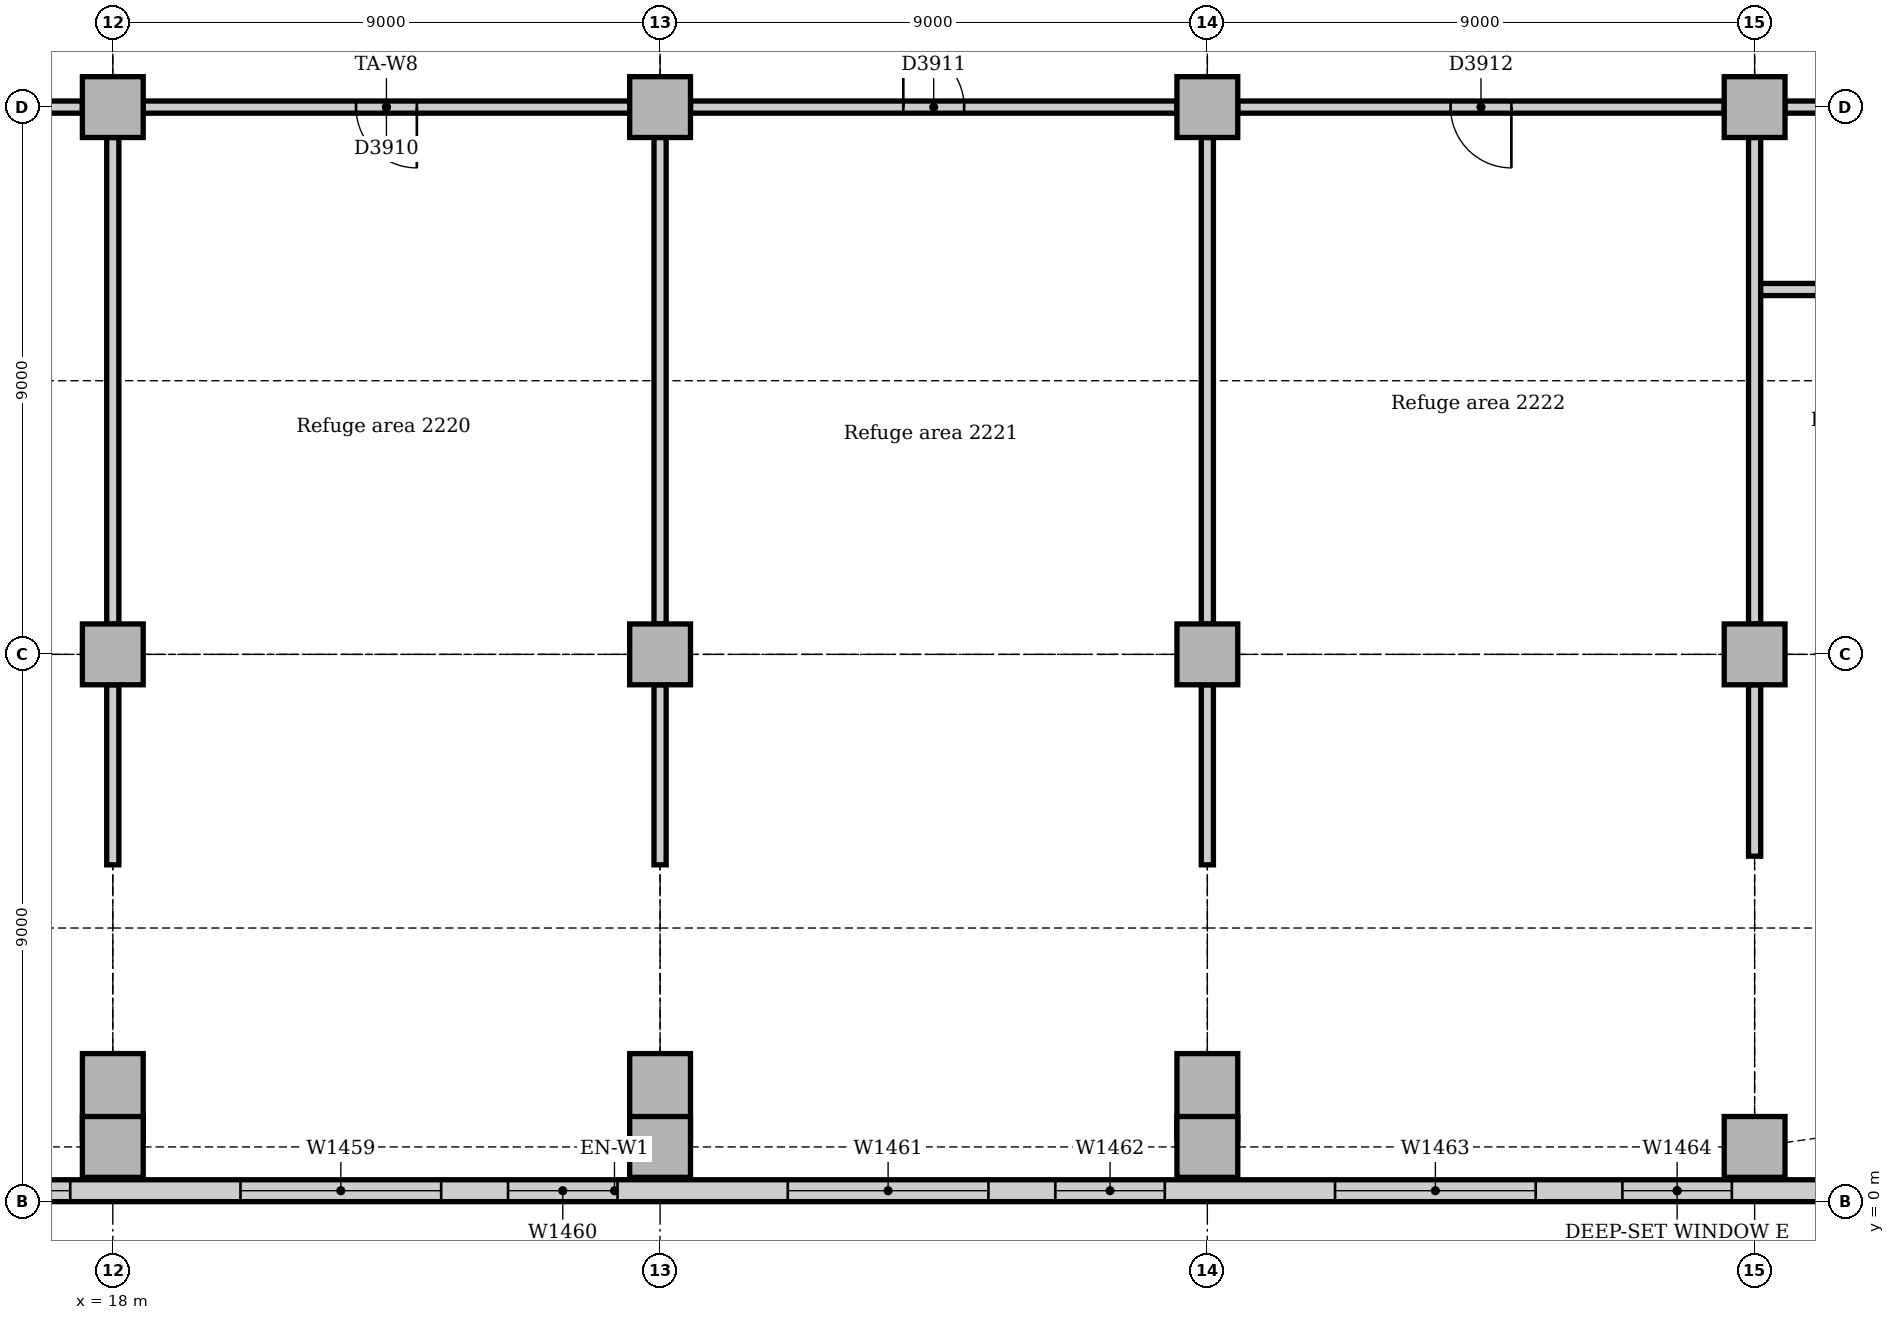
"""IFC4 building model, lengths in metres.
Left out: names, types, materials, properties, quantities, classifications, styles, units other than length and angle.
Written with IfcOpenShell. Run it as: python <this file> out.ifc"""

import sys

from ifc_helpers import new_model, si_unit, direction, frame, frame_2d, origin, origin_2d, place, context, subcontext, project, spatial, rectangle, extrude, element, fill, save


model = new_model("IFC4")
c1 = context("Model", 3, precision=1e-05, world=origin(), true_north=direction((0.0, 1.0)))
c2 = subcontext(c1, "Body", "Model", "MODEL_VIEW")
j1 = project(units=[si_unit("LENGTHUNIT", "METRE"), si_unit("PLANEANGLEUNIT", "RADIAN")], contexts=[c1])
p1 = place(None, origin())
s1 = spatial("IfcSite", under=j1, at=p1, CompositionType="ELEMENT")
p2 = place(p1, origin())
s2 = spatial("IfcBuilding", under=s1, at=p2, CompositionType="ELEMENT")
p3 = place(p2, frame((0.0, 0.0, 95.0)))
s3 = spatial("IfcBuildingStorey", under=s2, at=p3, CompositionType="ELEMENT", Elevation=95.0)
for number, where, z_axis, x_axis in (
    (1, (18.0, 0.9, 0.0), (0.0, 0.0, 1.0), (1.0, 0.0, 0.0)),
    (2, (27.0, 0.9, 0.0), (0.0, 0.0, 1.0), (1.0, 0.0, 0.0)),
    (3, (36.0, 0.9, 0.0), (0.0, 0.0, 1.0), (1.0, 0.0, 0.0)),
    (4, (45.0, 0.9, 0.0), (0.0, 0.0, 1.0), (1.0, 0.0, 0.0)),
    (5, (18.0, 9.0, 0.0), (0.0, 0.0, 1.0), (1.0, 0.0, 0.0)),
    (6, (18.0, 18.0, 0.0), (0.0, 0.0, 1.0), (1.0, 0.0, 0.0)),
    (7, (27.0, 9.0, 0.0), (0.0, 0.0, 1.0), (1.0, 0.0, 0.0)),
    (8, (27.0, 18.0, 0.0), (0.0, 0.0, 1.0), (1.0, 0.0, 0.0)),
    (9, (36.0, 9.0, 0.0), (0.0, 0.0, 1.0), (1.0, 0.0, 0.0)),
    (10, (36.0, 18.0, 0.0), (0.0, 0.0, 1.0), (1.0, 0.0, 0.0)),
    (11, (45.0, 9.0, 0.0), (0.0, 0.0, 1.0), (1.0, 0.0, 0.0)),
    (12, (45.0, 18.0, 0.0), (0.0, 0.0, 1.0), (1.0, 0.0, 0.0)),
):
    element("IfcColumn", number, at=place(p3, frame(where, z_axis=z_axis, x_axis=x_axis)), inside=s3, PredefinedType="COLUMN", context=c2, shape_type="SweptSolid", body=[
        extrude(rectangle(XDim=1.0, YDim=1.0, at=origin_2d()), origin(), (0.0, 0.0, 1.0), 4.85),
    ])
p4 = place(p3, frame((4.243, 0.18, 0.0), z_axis=(0.0, 0.0, 1.0), x_axis=(1.0, 0.0, 0.0)))
e13 = element("IfcWall", 13, at=p4, inside=s3, PredefinedType="STANDARD", context=c2, shape_type="SweptSolid", body=[
    extrude(rectangle(XDim=44.015, YDim=0.36, at=frame_2d((22.007, 0.0))), origin(), (0.0, 0.0, 1.0), 4.85),
])
p5 = place(p4, frame((2.257, 0.0, 1.2)))
e14 = element("IfcOpeningElement", 14, at=p5, cuts=e13, PredefinedType="OPENING", context=c2, shape_type="SweptSolid", body=[
    extrude(rectangle(XDim=1.8, YDim=1.2, at=frame_2d((0.9, 0.6))), frame((0.0, 0.19, 0.0), z_axis=(0.0, -1.0, 0.0), x_axis=(1.0, 0.0, 0.0)), (0.0, 0.0, 1.0), 0.38),
])
p6 = place(p4, frame((6.857, 0.0, 0.9)))
e15 = element("IfcOpeningElement", 15, at=p6, cuts=e13, PredefinedType="OPENING", context=c2, shape_type="SweptSolid", body=[
    extrude(rectangle(XDim=3.3, YDim=2.2, at=frame_2d((1.65, 1.1))), frame((0.0, 0.19, 0.0), z_axis=(0.0, -1.0, 0.0), x_axis=(1.0, 0.0, 0.0)), (0.0, 0.0, 1.0), 0.38),
])
p7 = place(p4, frame((11.257, 0.0, 1.2)))
e16 = element("IfcOpeningElement", 16, at=p7, cuts=e13, PredefinedType="OPENING", context=c2, shape_type="SweptSolid", body=[
    extrude(rectangle(XDim=1.8, YDim=1.2, at=frame_2d((0.9, 0.6))), frame((0.0, 0.19, 0.0), z_axis=(0.0, -1.0, 0.0), x_axis=(1.0, 0.0, 0.0)), (0.0, 0.0, 1.0), 0.38),
])
p8 = place(p4, frame((15.857, 0.0, 0.9)))
e17 = element("IfcOpeningElement", 17, at=p8, cuts=e13, PredefinedType="OPENING", context=c2, shape_type="SweptSolid", body=[
    extrude(rectangle(XDim=3.3, YDim=2.2, at=frame_2d((1.65, 1.1))), frame((0.0, 0.19, 0.0), z_axis=(0.0, -1.0, 0.0), x_axis=(1.0, 0.0, 0.0)), (0.0, 0.0, 1.0), 0.38),
])
p9 = place(p4, frame((20.257, 0.0, 1.2)))
e18 = element("IfcOpeningElement", 18, at=p9, cuts=e13, PredefinedType="OPENING", context=c2, shape_type="SweptSolid", body=[
    extrude(rectangle(XDim=1.8, YDim=1.2, at=frame_2d((0.9, 0.6))), frame((0.0, 0.19, 0.0), z_axis=(0.0, -1.0, 0.0), x_axis=(1.0, 0.0, 0.0)), (0.0, 0.0, 1.0), 0.38),
])
p10 = place(p4, frame((24.857, 0.0, 0.9)))
e19 = element("IfcOpeningElement", 19, at=p10, cuts=e13, PredefinedType="OPENING", context=c2, shape_type="SweptSolid", body=[
    extrude(rectangle(XDim=3.3, YDim=2.2, at=frame_2d((1.65, 1.1))), frame((0.0, 0.19, 0.0), z_axis=(0.0, -1.0, 0.0), x_axis=(1.0, 0.0, 0.0)), (0.0, 0.0, 1.0), 0.38),
])
p11 = place(p4, frame((29.257, 0.0, 1.2)))
e20 = element("IfcOpeningElement", 20, at=p11, cuts=e13, PredefinedType="OPENING", context=c2, shape_type="SweptSolid", body=[
    extrude(rectangle(XDim=1.8, YDim=1.2, at=frame_2d((0.9, 0.6))), frame((0.0, 0.19, 0.0), z_axis=(0.0, -1.0, 0.0), x_axis=(1.0, 0.0, 0.0)), (0.0, 0.0, 1.0), 0.38),
])
p12 = place(p4, frame((33.857, 0.0, 0.9)))
e21 = element("IfcOpeningElement", 21, at=p12, cuts=e13, PredefinedType="OPENING", context=c2, shape_type="SweptSolid", body=[
    extrude(rectangle(XDim=3.3, YDim=2.2, at=frame_2d((1.65, 1.1))), frame((0.0, 0.19, 0.0), z_axis=(0.0, -1.0, 0.0), x_axis=(1.0, 0.0, 0.0)), (0.0, 0.0, 1.0), 0.38),
])
p13 = place(p4, frame((38.583, 0.0, 0.9)))
e22 = element("IfcOpeningElement", 22, at=p13, cuts=e13, PredefinedType="OPENING", context=c2, shape_type="SweptSolid", body=[
    extrude(rectangle(XDim=1.8, YDim=2.2, at=frame_2d((0.9, 1.1))), frame((0.0, 0.19, 0.0), z_axis=(0.0, -1.0, 0.0), x_axis=(1.0, 0.0, 0.0)), (0.0, 0.0, 1.0), 0.38),
])
p14 = place(p3, frame((45.5, 18.0, 0.0), z_axis=(0.0, 0.0, 1.0), x_axis=(1.0, 0.0, 0.0)))
e23 = element("IfcWall", 23, at=p14, inside=s3, PredefinedType="PARTITIONING", context=c2, shape_type="SweptSolid", body=[
    extrude(rectangle(XDim=5.141, YDim=0.2, at=frame_2d((2.571, 0.0))), origin(), (0.0, 0.0, 1.0), 4.254),
])
p15 = place(p14, frame((2.05, 0.0, 0.0)))
e24 = element("IfcOpeningElement", 24, at=p15, cuts=e23, PredefinedType="OPENING", context=c2, shape_type="SweptSolid", body=[
    extrude(rectangle(XDim=1.0, YDim=2.1, at=frame_2d((0.5, 1.05))), frame((0.0, 0.11, 0.0), z_axis=(0.0, -1.0, 0.0), x_axis=(1.0, 0.0, 0.0)), (0.0, 0.0, 1.0), 0.22),
])
p16 = place(p3, frame((36.5, 18.0, 0.0), z_axis=(0.0, 0.0, 1.0), x_axis=(1.0, 0.0, 0.0)))
e25 = element("IfcWall", 25, at=p16, inside=s3, PredefinedType="PARTITIONING", context=c2, shape_type="SweptSolid", body=[
    extrude(rectangle(XDim=8.0, YDim=0.2, at=frame_2d((4.0, 0.0))), origin(), (0.0, 0.0, 1.0), 4.158),
])
p17 = place(p16, frame((3.5, 0.0, 0.0)))
e26 = element("IfcOpeningElement", 26, at=p17, cuts=e25, PredefinedType="OPENING", context=c2, shape_type="SweptSolid", body=[
    extrude(rectangle(XDim=1.0, YDim=2.1, at=frame_2d((0.5, 1.05))), frame((0.0, 0.11, 0.0), z_axis=(0.0, -1.0, 0.0), x_axis=(1.0, 0.0, 0.0)), (0.0, 0.0, 1.0), 0.22),
])
p18 = place(p3, frame((27.5, 18.0, 0.0), z_axis=(0.0, 0.0, 1.0), x_axis=(1.0, 0.0, 0.0)))
e27 = element("IfcWall", 27, at=p18, inside=s3, PredefinedType="PARTITIONING", context=c2, shape_type="SweptSolid", body=[
    extrude(rectangle(XDim=8.0, YDim=0.2, at=frame_2d((4.0, 0.0))), origin(), (0.0, 0.0, 1.0), 4.158),
])
p19 = place(p18, frame((3.5, 0.0, 0.0)))
e28 = element("IfcOpeningElement", 28, at=p19, cuts=e27, PredefinedType="OPENING", context=c2, shape_type="SweptSolid", body=[
    extrude(rectangle(XDim=1.0, YDim=2.1, at=frame_2d((0.5, 1.05))), frame((0.0, 0.11, 0.0), z_axis=(0.0, -1.0, 0.0), x_axis=(1.0, 0.0, 0.0)), (0.0, 0.0, 1.0), 0.22),
])
p20 = place(p3, frame((18.5, 18.0, 0.0), z_axis=(0.0, 0.0, 1.0), x_axis=(1.0, 0.0, 0.0)))
e29 = element("IfcWall", 29, at=p20, inside=s3, PredefinedType="PARTITIONING", context=c2, shape_type="SweptSolid", body=[
    extrude(rectangle(XDim=8.0, YDim=0.2, at=frame_2d((4.0, 0.0))), origin(), (0.0, 0.0, 1.0), 4.158),
])
p21 = place(p20, frame((3.5, 0.0, 0.0)))
e30 = element("IfcOpeningElement", 30, at=p21, cuts=e29, PredefinedType="OPENING", context=c2, shape_type="SweptSolid", body=[
    extrude(rectangle(XDim=1.0, YDim=2.1, at=frame_2d((0.5, 1.05))), frame((0.0, 0.11, 0.0), z_axis=(0.0, -1.0, 0.0), x_axis=(1.0, 0.0, 0.0)), (0.0, 0.0, 1.0), 0.22),
])
p22 = place(p3, frame((9.5, 18.0, 0.0), z_axis=(0.0, 0.0, 1.0), x_axis=(1.0, 0.0, 0.0)))
e31 = element("IfcWall", 31, at=p22, inside=s3, PredefinedType="PARTITIONING", context=c2, shape_type="SweptSolid", body=[
    extrude(rectangle(XDim=8.0, YDim=0.2, at=frame_2d((4.0, 0.0))), origin(), (0.0, 0.0, 1.0), 4.158),
])
p23 = place(p22, frame((3.5, 0.0, 0.0)))
e32 = element("IfcOpeningElement", 32, at=p23, cuts=e31, PredefinedType="OPENING", context=c2, shape_type="SweptSolid", body=[
    extrude(rectangle(XDim=1.0, YDim=2.1, at=frame_2d((0.5, 1.05))), frame((0.0, 0.11, 0.0), z_axis=(0.0, -1.0, 0.0), x_axis=(1.0, 0.0, 0.0)), (0.0, 0.0, 1.0), 0.22),
])
p24 = place(p3, frame((18.0, 5.539, 0.0), z_axis=(0.0, 0.0, 1.0), x_axis=(0.0, 1.0, 0.0)))
e33 = element("IfcWall", 33, at=p24, inside=s3, PredefinedType="PARTITIONING", context=c2, shape_type="SweptSolid", body=[
    extrude(rectangle(XDim=2.961, YDim=0.2, at=frame_2d((1.48, 0.0))), origin(), (0.0, 0.0, 1.0), 4.85),
])
p25 = place(p3, frame((18.0, 9.5, 0.0), z_axis=(0.0, 0.0, 1.0), x_axis=(0.0, 1.0, 0.0)))
e34 = element("IfcWall", 34, at=p25, inside=s3, PredefinedType="PARTITIONING", context=c2, shape_type="SweptSolid", body=[
    extrude(rectangle(XDim=8.0, YDim=0.2, at=frame_2d((4.0, 0.0))), origin(), (0.0, 0.0, 1.0), 4.256),
])
p26 = place(p3, frame((27.0, 5.539, 0.0), z_axis=(0.0, 0.0, 1.0), x_axis=(0.0, 1.0, 0.0)))
e35 = element("IfcWall", 35, at=p26, inside=s3, PredefinedType="PARTITIONING", context=c2, shape_type="SweptSolid", body=[
    extrude(rectangle(XDim=2.961, YDim=0.2, at=frame_2d((1.48, 0.0))), origin(), (0.0, 0.0, 1.0), 4.85),
])
p27 = place(p3, frame((27.0, 9.5, 0.0), z_axis=(0.0, 0.0, 1.0), x_axis=(0.0, 1.0, 0.0)))
e36 = element("IfcWall", 36, at=p27, inside=s3, PredefinedType="PARTITIONING", context=c2, shape_type="SweptSolid", body=[
    extrude(rectangle(XDim=8.0, YDim=0.2, at=frame_2d((4.0, 0.0))), origin(), (0.0, 0.0, 1.0), 4.256),
])
p28 = place(p3, frame((36.0, 5.539, 0.0), z_axis=(0.0, 0.0, 1.0), x_axis=(0.0, 1.0, 0.0)))
e37 = element("IfcWall", 37, at=p28, inside=s3, PredefinedType="PARTITIONING", context=c2, shape_type="SweptSolid", body=[
    extrude(rectangle(XDim=2.961, YDim=0.2, at=frame_2d((1.48, 0.0))), origin(), (0.0, 0.0, 1.0), 4.85),
])
p29 = place(p3, frame((36.0, 9.5, 0.0), z_axis=(0.0, 0.0, 1.0), x_axis=(0.0, 1.0, 0.0)))
e38 = element("IfcWall", 38, at=p29, inside=s3, PredefinedType="PARTITIONING", context=c2, shape_type="SweptSolid", body=[
    extrude(rectangle(XDim=8.0, YDim=0.2, at=frame_2d((4.0, 0.0))), origin(), (0.0, 0.0, 1.0), 4.256),
])
p30 = place(p3, frame((45.0, 5.681, 0.0), z_axis=(0.0, 0.0, 1.0), x_axis=(0.0, 1.0, 0.0)))
e39 = element("IfcWall", 39, at=p30, inside=s3, PredefinedType="PARTITIONING", context=c2, shape_type="SweptSolid", body=[
    extrude(rectangle(XDim=2.819, YDim=0.2, at=frame_2d((1.41, 0.0))), origin(), (0.0, 0.0, 1.0), 4.254),
])
p31 = place(p3, frame((45.0, 9.5, 0.0), z_axis=(0.0, 0.0, 1.0), x_axis=(0.0, 1.0, 0.0)))
e40 = element("IfcWall", 40, at=p31, inside=s3, PredefinedType="PARTITIONING", context=c2, shape_type="SweptSolid", body=[
    extrude(rectangle(XDim=8.0, YDim=0.2, at=frame_2d((4.0, 0.0))), origin(), (0.0, 0.0, 1.0), 4.256),
])
p32 = place(p3, frame((45.1, 15.0, 0.0), z_axis=(0.0, 0.0, 1.0), x_axis=(1.0, 0.0, 0.0)))
e41 = element("IfcWall", 41, at=p32, inside=s3, PredefinedType="PARTITIONING", context=c2, shape_type="SweptSolid", body=[
    extrude(rectangle(XDim=5.428, YDim=0.2, at=frame_2d((2.714, 0.0))), origin(), (0.0, 0.0, 1.0), 4.85),
])
p33 = place(p32, frame((2.2, 0.0, 0.0)))
e42 = element("IfcOpeningElement", 42, at=p33, cuts=e41, PredefinedType="OPENING", context=c2, shape_type="SweptSolid", body=[
    extrude(rectangle(XDim=1.0, YDim=2.1, at=frame_2d((0.5, 1.05))), frame((0.0, 0.11, 0.0), z_axis=(0.0, -1.0, 0.0), x_axis=(1.0, 0.0, 0.0)), (0.0, 0.0, 1.0), 0.22),
])
p34 = place(p7, origin())
e43 = element("IfcWindow", 43, at=p34, inside=s3, PartitioningType="SINGLE_PANEL", PredefinedType="WINDOW", context=c2, shape_type="SweptSolid", body=[
    extrude(rectangle(XDim=1.8, YDim=1.2, at=frame_2d((0.9, 0.6))), frame((0.0, 0.13, 0.0), z_axis=(0.0, -1.0, 0.0), x_axis=(1.0, 0.0, 0.0)), (0.0, 0.0, 1.0), 0.06),
])
fill(e16, e43)
p35 = place(p8, origin())
e44 = element("IfcWindow", 44, at=p35, inside=s3, PartitioningType="SINGLE_PANEL", PredefinedType="WINDOW", context=c2, shape_type="SweptSolid", body=[
    extrude(rectangle(XDim=3.3, YDim=2.2, at=frame_2d((1.65, 1.1))), frame((0.0, 0.13, 0.0), z_axis=(0.0, -1.0, 0.0), x_axis=(1.0, 0.0, 0.0)), (0.0, 0.0, 1.0), 0.06),
])
fill(e17, e44)
p36 = place(p9, origin())
e45 = element("IfcWindow", 45, at=p36, inside=s3, PartitioningType="SINGLE_PANEL", PredefinedType="WINDOW", context=c2, shape_type="SweptSolid", body=[
    extrude(rectangle(XDim=1.8, YDim=1.2, at=frame_2d((0.9, 0.6))), frame((0.0, 0.13, 0.0), z_axis=(0.0, -1.0, 0.0), x_axis=(1.0, 0.0, 0.0)), (0.0, 0.0, 1.0), 0.06),
])
fill(e18, e45)
p37 = place(p10, origin())
e46 = element("IfcWindow", 46, at=p37, inside=s3, PartitioningType="SINGLE_PANEL", PredefinedType="WINDOW", context=c2, shape_type="SweptSolid", body=[
    extrude(rectangle(XDim=3.3, YDim=2.2, at=frame_2d((1.65, 1.1))), frame((0.0, 0.13, 0.0), z_axis=(0.0, -1.0, 0.0), x_axis=(1.0, 0.0, 0.0)), (0.0, 0.0, 1.0), 0.06),
])
fill(e19, e46)
p38 = place(p11, origin())
e47 = element("IfcWindow", 47, at=p38, inside=s3, PartitioningType="SINGLE_PANEL", PredefinedType="WINDOW", context=c2, shape_type="SweptSolid", body=[
    extrude(rectangle(XDim=1.8, YDim=1.2, at=frame_2d((0.9, 0.6))), frame((0.0, 0.13, 0.0), z_axis=(0.0, -1.0, 0.0), x_axis=(1.0, 0.0, 0.0)), (0.0, 0.0, 1.0), 0.06),
])
fill(e20, e47)
p39 = place(p12, origin())
e48 = element("IfcWindow", 48, at=p39, inside=s3, PartitioningType="SINGLE_PANEL", PredefinedType="WINDOW", context=c2, shape_type="SweptSolid", body=[
    extrude(rectangle(XDim=3.3, YDim=2.2, at=frame_2d((1.65, 1.1))), frame((0.0, 0.13, 0.0), z_axis=(0.0, -1.0, 0.0), x_axis=(1.0, 0.0, 0.0)), (0.0, 0.0, 1.0), 0.06),
])
fill(e21, e48)
p40 = place(p13, origin())
e49 = element("IfcWindow", 49, at=p40, inside=s3, PartitioningType="SINGLE_PANEL", PredefinedType="WINDOW", context=c2, shape_type="SweptSolid", body=[
    extrude(rectangle(XDim=1.8, YDim=2.2, at=frame_2d((0.9, 1.1))), frame((0.0, 0.13, 0.0), z_axis=(0.0, -1.0, 0.0), x_axis=(1.0, 0.0, 0.0)), (0.0, 0.0, 1.0), 0.06),
])
fill(e22, e49)
p41 = place(p21, frame((1.0, 0.0, 0.0), z_axis=(0.0, 0.0, 1.0), x_axis=(-1.0, 0.0, 0.0)))
e50 = element("IfcDoor", 50, at=p41, inside=s3, OperationType="SINGLE_SWING_LEFT", PredefinedType="DOOR", context=c2, shape_type="SweptSolid", body=[
    extrude(rectangle(XDim=1.0, YDim=2.1, at=frame_2d((0.5, 1.05))), frame((0.0, 0.025, 0.0), z_axis=(0.0, -1.0, 0.0), x_axis=(1.0, 0.0, 0.0)), (0.0, 0.0, 1.0), 0.05),
])
fill(e30, e50)
p42 = place(p19, origin())
e51 = element("IfcDoor", 51, at=p42, inside=s3, OperationType="SINGLE_SWING_LEFT", PredefinedType="DOOR", context=c2, shape_type="SweptSolid", body=[
    extrude(rectangle(XDim=1.0, YDim=2.1, at=frame_2d((0.5, 1.05))), frame((0.0, 0.025, 0.0), z_axis=(0.0, -1.0, 0.0), x_axis=(1.0, 0.0, 0.0)), (0.0, 0.0, 1.0), 0.05),
])
fill(e28, e51)
p43 = place(p17, frame((1.0, 0.0, 0.0), z_axis=(0.0, 0.0, 1.0), x_axis=(-1.0, 0.0, 0.0)))
e52 = element("IfcDoor", 52, at=p43, inside=s3, OperationType="SINGLE_SWING_LEFT", PredefinedType="DOOR", context=c2, shape_type="SweptSolid", body=[
    extrude(rectangle(XDim=1.0, YDim=2.1, at=frame_2d((0.5, 1.05))), frame((0.0, 0.025, 0.0), z_axis=(0.0, -1.0, 0.0), x_axis=(1.0, 0.0, 0.0)), (0.0, 0.0, 1.0), 0.05),
])
fill(e26, e52)
save(model, sys.argv[1])
